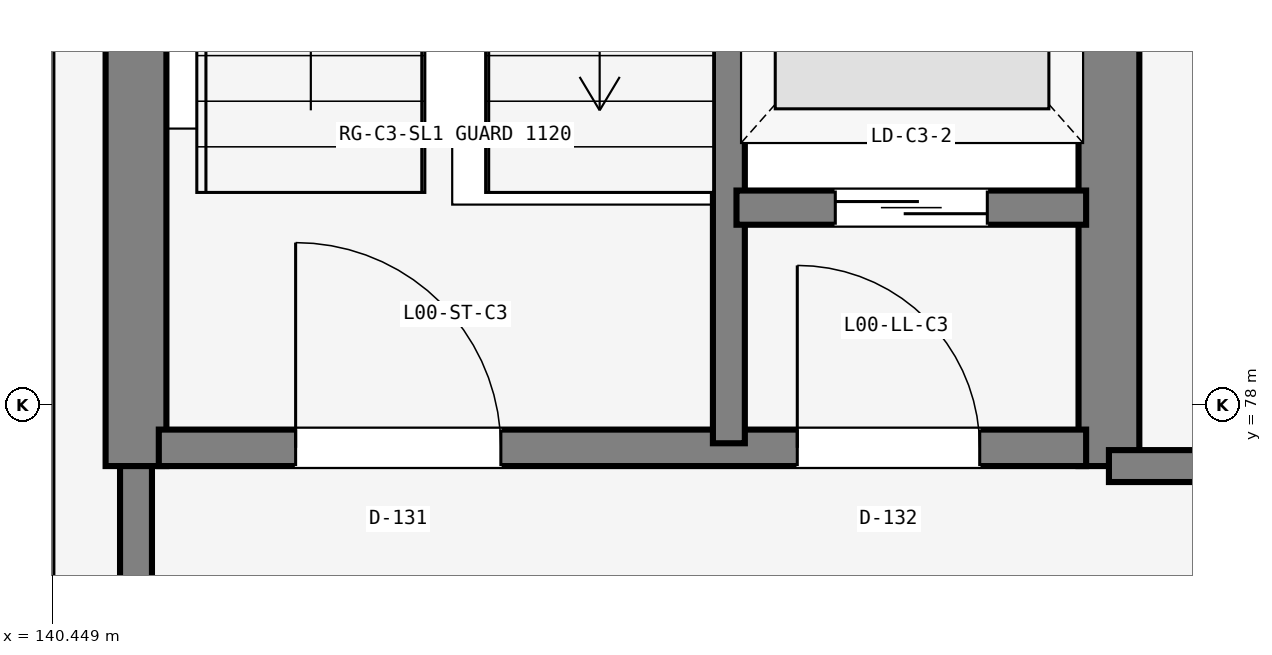
"""IFC4 building model, lengths in metres.
Left out: names, types, materials, properties, quantities, classifications, styles, units other than length and angle.
Written with IfcOpenShell. Run it as: python <this file> out.ifc"""

import sys

from ifc_helpers import new_model, si_unit, direction, frame, frame_2d, origin, origin_2d, place, context, subcontext, project, spatial, rectangle, extrude, element, fill, save


model = new_model("IFC4")
c1 = context("Model", 3, precision=1e-05, world=origin(), true_north=direction((0.0, 1.0)))
c2 = subcontext(c1, "Body", "Model", "MODEL_VIEW")
j1 = project(units=[si_unit("LENGTHUNIT", "METRE"), si_unit("PLANEANGLEUNIT", "RADIAN")], contexts=[c1])
p1 = place(None, origin())
s1 = spatial("IfcSite", under=j1, at=p1, CompositionType="ELEMENT")
p2 = place(p1, origin())
s2 = spatial("IfcBuilding", under=s1, at=p2, CompositionType="ELEMENT")
p3 = place(p2, origin())
s3 = spatial("IfcBuildingStorey", under=s2, at=p3, CompositionType="ELEMENT", Elevation=0.0)
p4 = place(p3, frame((148.2, 78.0, 0.0), z_axis=(0.0, 0.0, 1.0), x_axis=(1.0, 0.0, 0.0)))
e1 = element("IfcColumn", 1, at=p4, inside=s3, PredefinedType="COLUMN", context=c2, shape_type="SweptSolid", body=[
    extrude(rectangle(XDim=0.75, YDim=0.75, at=origin_2d()), origin(), (0.0, 0.0, 1.0), 5.4),
])
for number, where, z_axis, x_axis in (
    (2, (141.0, 77.6, 0.0), (0.0, 0.0, 1.0), (0.0, 1.0, 0.0)),
    (3, (147.4, 77.6, 0.0), (0.0, 0.0, 1.0), (0.0, 1.0, 0.0)),
):
    element("IfcWall", number, at=place(p3, frame(where, z_axis=z_axis, x_axis=x_axis)), inside=s3, PredefinedType="SHEAR", context=c2, shape_type="SweptSolid", body=[
        extrude(rectangle(XDim=8.6, YDim=0.4, at=frame_2d((4.3, 0.0))), origin(), (0.0, 0.0, 1.0), 5.4),
    ])
p5 = place(p3, frame((141.15, 77.72, 0.0), z_axis=(0.0, 0.0, 1.0), x_axis=(1.0, 0.0, 0.0)))
e4 = element("IfcWall", 4, at=p5, inside=s3, PredefinedType="PARTITIONING", context=c2, shape_type="SweptSolid", body=[
    extrude(rectangle(XDim=6.1, YDim=0.24, at=frame_2d((3.05, 0.0))), origin(), (0.0, 0.0, 1.0), 4.46),
])
p6 = place(p5, frame((0.9, 0.0, 0.0)))
e5 = element("IfcOpeningElement", 5, at=p6, cuts=e4, PredefinedType="OPENING", context=c2, shape_type="SweptSolid", body=[
    extrude(rectangle(XDim=1.35, YDim=2.2, at=frame_2d((0.675, 1.1))), frame((0.0, 0.13, 0.0), z_axis=(0.0, -1.0, 0.0), x_axis=(1.0, 0.0, 0.0)), (0.0, 0.0, 1.0), 0.26),
])
p7 = place(p5, frame((4.2, 0.0, 0.0)))
e6 = element("IfcOpeningElement", 6, at=p7, cuts=e4, PredefinedType="OPENING", context=c2, shape_type="SweptSolid", body=[
    extrude(rectangle(XDim=1.2, YDim=2.2, at=frame_2d((0.6, 1.1))), frame((0.0, 0.13, 0.0), z_axis=(0.0, -1.0, 0.0), x_axis=(1.0, 0.0, 0.0)), (0.0, 0.0, 1.0), 0.26),
])
p8 = place(p3, frame((144.9, 77.75, 0.0), z_axis=(0.0, 0.0, 1.0), x_axis=(0.0, 1.0, 0.0)))
e7 = element("IfcWall", 7, at=p8, inside=s3, PredefinedType="PARTITIONING", context=c2, shape_type="SweptSolid", body=[
    extrude(rectangle(XDim=8.3, YDim=0.21, at=frame_2d((4.15, 0.0))), origin(), (0.0, 0.0, 1.0), 4.46),
])
p9 = place(p3, frame((144.95, 79.3, 0.0), z_axis=(0.0, 0.0, 1.0), x_axis=(1.0, 0.0, 0.0)))
e8 = element("IfcWall", 8, at=p9, inside=s3, PredefinedType="PARTITIONING", context=c2, shape_type="SweptSolid", body=[
    extrude(rectangle(XDim=2.3, YDim=0.225, at=frame_2d((1.15, 0.0))), origin(), (0.0, 0.0, 1.0), 4.46),
])
p10 = place(p9, frame((0.65, 0.0, 0.0)))
e9 = element("IfcOpeningElement", 9, at=p10, cuts=e8, PredefinedType="OPENING", context=c2, shape_type="SweptSolid", body=[
    extrude(rectangle(XDim=1.0, YDim=2.15, at=frame_2d((0.5, 1.075))), frame((0.0, 0.123, 0.0), z_axis=(0.0, -1.0, 0.0), x_axis=(1.0, 0.0, 0.0)), (0.0, 0.0, 1.0), 0.245),
])
p11 = place(p3, frame((141.0, 77.6, 0.0), z_axis=(0.0, 0.0, 1.0), x_axis=(0.0, -1.0, 0.0)))
e10 = element("IfcWall", 10, at=p11, inside=s3, PredefinedType="PARTITIONING", context=c2, shape_type="SweptSolid", body=[
    extrude(rectangle(XDim=3.6, YDim=0.21, at=frame_2d((1.8, 0.0))), origin(), (0.0, 0.0, 1.0), 3.45),
])
p12 = place(p3, frame((147.4, 77.6, 0.0), z_axis=(0.0, 0.0, 1.0), x_axis=(1.0, 0.0, 0.0)))
e11 = element("IfcWall", 11, at=p12, inside=s3, PredefinedType="PARTITIONING", context=c2, shape_type="SweptSolid", body=[
    extrude(rectangle(XDim=16.55, YDim=0.21, at=frame_2d((8.275, 0.0))), origin(), (0.0, 0.0, 1.0), 3.45),
])
p13 = place(p6, origin())
e12 = element("IfcDoor", 12, at=p13, inside=s3, OperationType="SINGLE_SWING_RIGHT", PredefinedType="DOOR", context=c2, shape_type="SweptSolid", body=[
    extrude(rectangle(XDim=1.35, YDim=2.2, at=frame_2d((0.675, 1.1))), frame((0.0, 0.025, 0.0), z_axis=(0.0, -1.0, 0.0), x_axis=(1.0, 0.0, 0.0)), (0.0, 0.0, 1.0), 0.05),
])
fill(e5, e12)
p14 = place(p7, origin())
e13 = element("IfcDoor", 13, at=p14, inside=s3, OperationType="SINGLE_SWING_LEFT", PredefinedType="DOOR", context=c2, shape_type="SweptSolid", body=[
    extrude(rectangle(XDim=1.2, YDim=2.2, at=frame_2d((0.6, 1.1))), frame((0.0, 0.025, 0.0), z_axis=(0.0, -1.0, 0.0), x_axis=(1.0, 0.0, 0.0)), (0.0, 0.0, 1.0), 0.05),
])
fill(e6, e13)
p15 = place(p10, origin())
e14 = element("IfcDoor", 14, at=p15, inside=s3, OperationType="SLIDING_TO_RIGHT", PredefinedType="DOOR", context=c2, shape_type="SweptSolid", body=[
    extrude(rectangle(XDim=1.0, YDim=2.15, at=frame_2d((0.5, 1.075))), frame((0.0, 0.025, 0.0), z_axis=(0.0, -1.0, 0.0), x_axis=(1.0, 0.0, 0.0)), (0.0, 0.0, 1.0), 0.05),
])
fill(e9, e14)
save(model, sys.argv[1])
